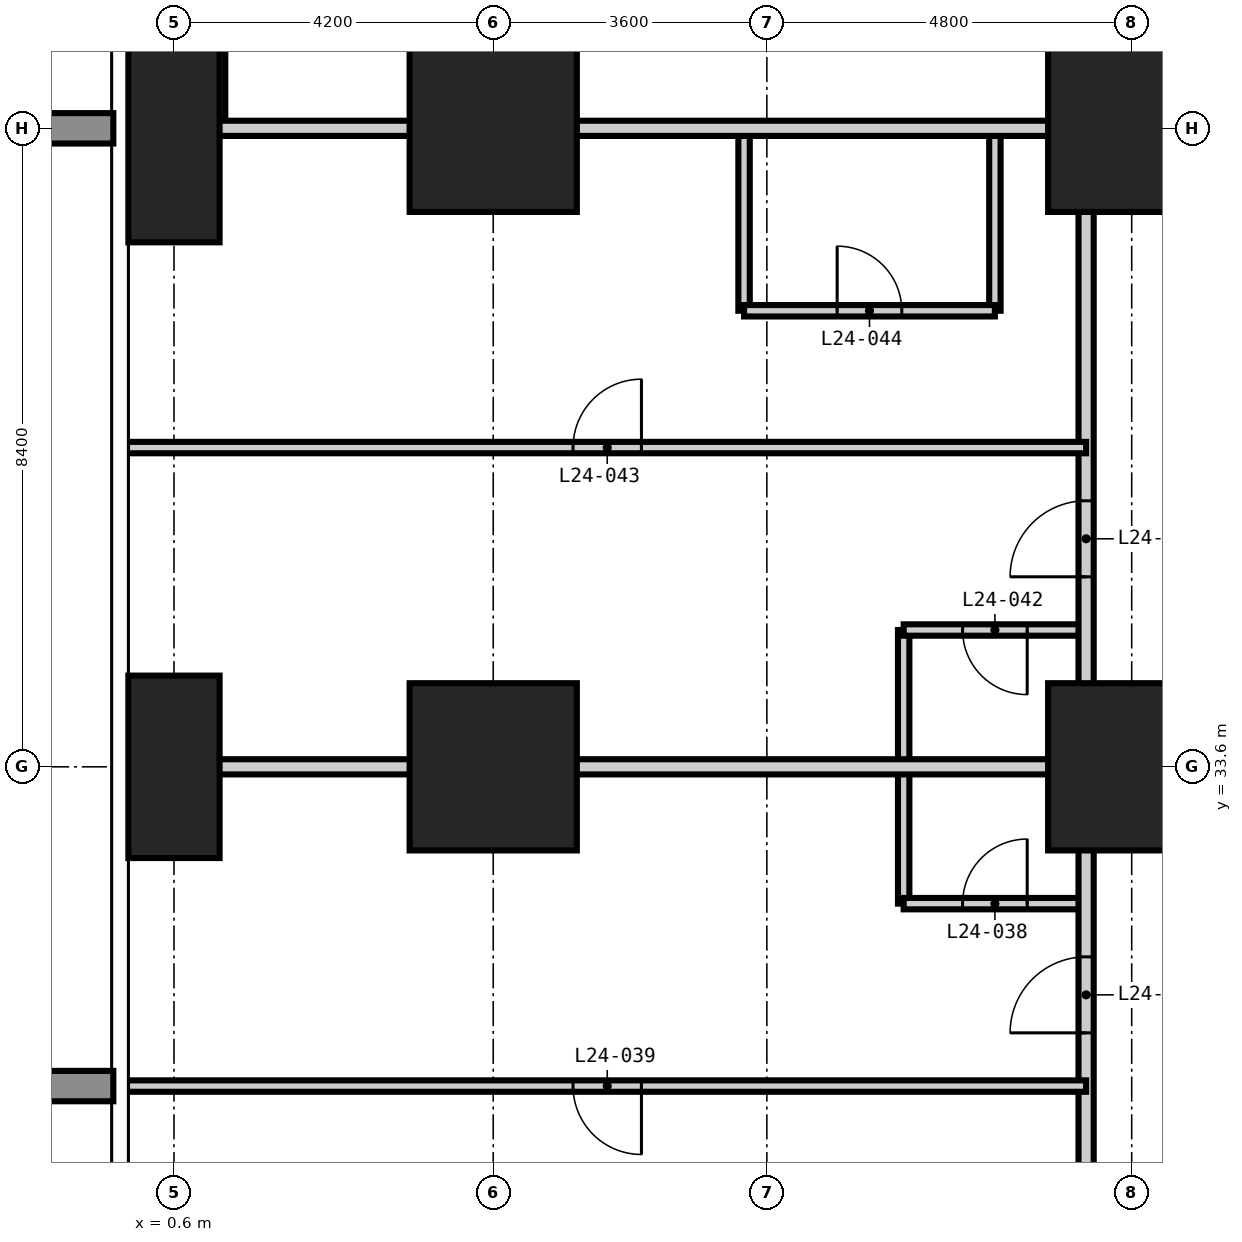
"""IFC4 building model, lengths in metres.
Left out: names, types, materials, properties, quantities, classifications, styles, units other than length and angle.
Written with IfcOpenShell. Run it as: python <this file> out.ifc"""

import sys

from ifc_helpers import new_model, si_unit, direction, frame, frame_2d, origin, origin_2d, place, context, subcontext, project, spatial, rectangle, extrude, element, fill, save


model = new_model("IFC4")
c1 = context("Model", 3, precision=1e-05, world=origin(), true_north=direction((0.0, 1.0)))
c2 = subcontext(c1, "Body", "Model", "MODEL_VIEW")
j1 = project(units=[si_unit("LENGTHUNIT", "METRE"), si_unit("PLANEANGLEUNIT", "RADIAN")], contexts=[c1])
p1 = place(None, origin())
s1 = spatial("IfcSite", under=j1, at=p1, CompositionType="ELEMENT")
p2 = place(p1, origin())
s2 = spatial("IfcBuilding", under=s1, at=p2, CompositionType="ELEMENT")
p3 = place(p2, frame((0.0, 0.0, 97.2)))
s3 = spatial("IfcBuildingStorey", under=s2, at=p3, CompositionType="ELEMENT", Elevation=97.2)
p4 = place(p3, frame((0.6, 33.6, -0.35), z_axis=(0.0, 0.0, 1.0), x_axis=(1.0, 0.0, 0.0)))
e1 = element("IfcColumn", 1, at=p4, inside=s3, PredefinedType="COLUMN", context=c2, shape_type="SweptSolid", body=[
    extrude(rectangle(XDim=1.2, YDim=2.4, at=origin_2d()), origin(), (0.0, 0.0, 1.0), 3.6),
])
p5 = place(p3, frame((0.6, 42.0, -0.35), z_axis=(0.0, 0.0, 1.0), x_axis=(1.0, 0.0, 0.0)))
e2 = element("IfcColumn", 2, at=p5, inside=s3, PredefinedType="COLUMN", context=c2, shape_type="SweptSolid", body=[
    extrude(rectangle(XDim=1.2, YDim=3.0, at=origin_2d()), origin(), (0.0, 0.0, 1.0), 3.6),
])
for number, where, z_axis, x_axis in (
    (3, (4.8, 33.6, -0.35), (0.0, 0.0, 1.0), (1.0, 0.0, 0.0)),
    (4, (4.8, 42.0, -0.35), (0.0, 0.0, 1.0), (1.0, 0.0, 0.0)),
    (5, (13.2, 33.6, -0.35), (0.0, 0.0, 1.0), (1.0, 0.0, 0.0)),
    (6, (13.2, 42.0, -0.35), (0.0, 0.0, 1.0), (1.0, 0.0, 0.0)),
):
    element("IfcColumn", number, at=place(p3, frame(where, z_axis=z_axis, x_axis=x_axis)), inside=s3, PredefinedType="COLUMN", context=c2, shape_type="SweptSolid", body=[
        extrude(rectangle(XDim=2.2, YDim=2.2, at=origin_2d()), origin(), (0.0, 0.0, 1.0), 3.6),
    ])
p6 = place(p3, frame((1.2, 42.0, 0.0), z_axis=(0.0, 0.0, 1.0), x_axis=(0.0, 1.0, 0.0)))
e7 = element("IfcWall", 7, at=p6, inside=s3, PredefinedType="PARTITIONING", context=c2, shape_type="SweptSolid", body=[
    extrude(rectangle(XDim=3.6, YDim=0.15, at=frame_2d((1.8, 0.0))), origin(), (0.0, 0.0, 1.0), 3.25),
])
p7 = place(p6, frame((1.575, 0.0, 0.0)))
e8 = element("IfcOpeningElement", 8, at=p7, cuts=e7, PredefinedType="OPENING", context=c2, shape_type="SweptSolid", body=[
    extrude(rectangle(XDim=0.85, YDim=2.1, at=frame_2d((0.425, 1.05))), frame((0.0, 0.085, 0.0), z_axis=(0.0, -1.0, 0.0), x_axis=(1.0, 0.0, 0.0)), (0.0, 0.0, 1.0), 0.17),
])
p8 = place(p3, frame((8.1, 39.6, 0.0), z_axis=(0.0, 0.0, 1.0), x_axis=(0.0, 1.0, 0.0)))
e9 = element("IfcWall", 9, at=p8, inside=s3, PredefinedType="PARTITIONING", context=c2, shape_type="SweptSolid", body=[
    extrude(rectangle(XDim=2.4, YDim=0.15, at=frame_2d((1.2, 0.0))), origin(), (0.0, 0.0, 1.0), 3.25),
])
p9 = place(p3, frame((10.2, 31.8, 0.0), z_axis=(0.0, 0.0, 1.0), x_axis=(0.0, 1.0, 0.0)))
e10 = element("IfcWall", 10, at=p9, inside=s3, PredefinedType="PARTITIONING", context=c2, shape_type="SweptSolid", body=[
    extrude(rectangle(XDim=3.6, YDim=0.15, at=frame_2d((1.8, 0.0))), origin(), (0.0, 0.0, 1.0), 3.25),
])
p10 = place(p3, frame((11.4, 39.6, 0.0), z_axis=(0.0, 0.0, 1.0), x_axis=(0.0, 1.0, 0.0)))
e11 = element("IfcWall", 11, at=p10, inside=s3, PredefinedType="PARTITIONING", context=c2, shape_type="SweptSolid", body=[
    extrude(rectangle(XDim=2.4, YDim=0.15, at=frame_2d((1.2, 0.0))), origin(), (0.0, 0.0, 1.0), 3.25),
])
p11 = place(p3, frame((10.2, 31.8, 0.0), z_axis=(0.0, 0.0, 1.0), x_axis=(1.0, 0.0, 0.0)))
e12 = element("IfcWall", 12, at=p11, inside=s3, PredefinedType="PARTITIONING", context=c2, shape_type="SweptSolid", body=[
    extrude(rectangle(XDim=2.4, YDim=0.15, at=frame_2d((1.2, 0.0))), origin(), (0.0, 0.0, 1.0), 3.25),
])
p12 = place(p11, frame((0.775, 0.0, 0.0)))
e13 = element("IfcOpeningElement", 13, at=p12, cuts=e12, PredefinedType="OPENING", context=c2, shape_type="SweptSolid", body=[
    extrude(rectangle(XDim=0.85, YDim=2.1, at=frame_2d((0.425, 1.05))), frame((0.0, 0.085, 0.0), z_axis=(0.0, -1.0, 0.0), x_axis=(1.0, 0.0, 0.0)), (0.0, 0.0, 1.0), 0.17),
])
p13 = place(p3, frame((10.2, 35.4, 0.0), z_axis=(0.0, 0.0, 1.0), x_axis=(1.0, 0.0, 0.0)))
e14 = element("IfcWall", 14, at=p13, inside=s3, PredefinedType="PARTITIONING", context=c2, shape_type="SweptSolid", body=[
    extrude(rectangle(XDim=2.4, YDim=0.15, at=frame_2d((1.2, 0.0))), origin(), (0.0, 0.0, 1.0), 3.25),
])
p14 = place(p13, frame((0.775, 0.0, 0.0)))
e15 = element("IfcOpeningElement", 15, at=p14, cuts=e14, PredefinedType="OPENING", context=c2, shape_type="SweptSolid", body=[
    extrude(rectangle(XDim=0.85, YDim=2.1, at=frame_2d((0.425, 1.05))), frame((0.0, 0.085, 0.0), z_axis=(0.0, -1.0, 0.0), x_axis=(1.0, 0.0, 0.0)), (0.0, 0.0, 1.0), 0.17),
])
p15 = place(p3, frame((8.1, 39.6, 0.0), z_axis=(0.0, 0.0, 1.0), x_axis=(1.0, 0.0, 0.0)))
e16 = element("IfcWall", 16, at=p15, inside=s3, PredefinedType="PARTITIONING", context=c2, shape_type="SweptSolid", body=[
    extrude(rectangle(XDim=3.3, YDim=0.15, at=frame_2d((1.65, 0.0))), origin(), (0.0, 0.0, 1.0), 3.25),
])
p16 = place(p15, frame((1.225, 0.0, 0.0)))
e17 = element("IfcOpeningElement", 17, at=p16, cuts=e16, PredefinedType="OPENING", context=c2, shape_type="SweptSolid", body=[
    extrude(rectangle(XDim=0.85, YDim=2.1, at=frame_2d((0.425, 1.05))), frame((0.0, 0.085, 0.0), z_axis=(0.0, -1.0, 0.0), x_axis=(1.0, 0.0, 0.0)), (0.0, 0.0, 1.0), 0.17),
])
p17 = place(p3, frame((12.6, 13.7, 0.0), z_axis=(0.0, 0.0, 1.0), x_axis=(0.0, 1.0, 0.0)))
e18 = element("IfcWall", 18, at=p17, inside=s3, PredefinedType="PARTITIONING", context=c2, shape_type="SweptSolid", body=[
    extrude(rectangle(XDim=32.0, YDim=0.2, at=frame_2d((16.0, 0.0))), origin(), (0.0, 0.0, 1.0), 3.25),
])
p18 = place(p17, frame((5.6, 0.0, 0.0)))
e19 = element("IfcOpeningElement", 19, at=p18, cuts=e18, PredefinedType="OPENING", context=c2, shape_type="SweptSolid", body=[
    extrude(rectangle(XDim=1.0, YDim=2.2, at=frame_2d((0.5, 1.1))), frame((0.0, 0.11, 0.0), z_axis=(0.0, -1.0, 0.0), x_axis=(1.0, 0.0, 0.0)), (0.0, 0.0, 1.0), 0.22),
])
p19 = place(p17, frame((16.4, 0.0, 0.0)))
e20 = element("IfcOpeningElement", 20, at=p19, cuts=e18, PredefinedType="OPENING", context=c2, shape_type="SweptSolid", body=[
    extrude(rectangle(XDim=1.0, YDim=2.2, at=frame_2d((0.5, 1.1))), frame((0.0, 0.11, 0.0), z_axis=(0.0, -1.0, 0.0), x_axis=(1.0, 0.0, 0.0)), (0.0, 0.0, 1.0), 0.22),
])
p20 = place(p17, frame((22.4, 0.0, 0.0)))
e21 = element("IfcOpeningElement", 21, at=p20, cuts=e18, PredefinedType="OPENING", context=c2, shape_type="SweptSolid", body=[
    extrude(rectangle(XDim=1.0, YDim=2.2, at=frame_2d((0.5, 1.1))), frame((0.0, 0.11, 0.0), z_axis=(0.0, -1.0, 0.0), x_axis=(1.0, 0.0, 0.0)), (0.0, 0.0, 1.0), 0.22),
])
p21 = place(p17, frame((0.95, 0.0, 0.0)))
e22 = element("IfcOpeningElement", 22, at=p21, cuts=e18, PredefinedType="OPENING", context=c2, shape_type="SweptSolid", body=[
    extrude(rectangle(XDim=1.0, YDim=2.2, at=frame_2d((0.5, 1.1))), frame((0.0, 0.11, 0.0), z_axis=(0.0, -1.0, 0.0), x_axis=(1.0, 0.0, 0.0)), (0.0, 0.0, 1.0), 0.22),
])
p22 = place(p17, frame((29.65, 0.0, 0.0)))
e23 = element("IfcOpeningElement", 23, at=p22, cuts=e18, PredefinedType="OPENING", context=c2, shape_type="SweptSolid", body=[
    extrude(rectangle(XDim=1.0, YDim=2.2, at=frame_2d((0.5, 1.1))), frame((0.0, 0.11, 0.0), z_axis=(0.0, -1.0, 0.0), x_axis=(1.0, 0.0, 0.0)), (0.0, 0.0, 1.0), 0.22),
])
for number, where, z_axis, x_axis in (
    (24, (-0.018, 33.6, 0.0), (0.0, 0.0, 1.0), (1.0, 0.0, 0.0)),
    (25, (-0.018, 42.0, 0.0), (0.0, 0.0, 1.0), (1.0, 0.0, 0.0)),
):
    element("IfcWall", number, at=place(p3, frame(where, z_axis=z_axis, x_axis=x_axis)), inside=s3, PredefinedType="PARTITIONING", context=c2, shape_type="SweptSolid", body=[
        extrude(rectangle(XDim=12.618, YDim=0.2, at=frame_2d((6.309, 0.0))), origin(), (0.0, 0.0, 1.0), 3.25),
    ])
p23 = place(p3, frame((4.2, 42.0, 0.0), z_axis=(0.0, 0.0, 1.0), x_axis=(0.0, 1.0, 0.0)))
e26 = element("IfcWall", 26, at=p23, inside=s3, PredefinedType="PARTITIONING", context=c2, shape_type="SweptSolid", body=[
    extrude(rectangle(XDim=12.618, YDim=0.15, at=frame_2d((6.309, 0.0))), origin(), (0.0, 0.0, 1.0), 3.25),
])
p24 = place(p23, frame((9.55, 0.0, 0.0)))
e27 = element("IfcOpeningElement", 27, at=p24, cuts=e26, PredefinedType="OPENING", context=c2, shape_type="SweptSolid", body=[
    extrude(rectangle(XDim=0.9, YDim=2.1, at=frame_2d((0.45, 1.05))), frame((0.0, 0.085, 0.0), z_axis=(0.0, -1.0, 0.0), x_axis=(1.0, 0.0, 0.0)), (0.0, 0.0, 1.0), 0.17),
])
p25 = place(p3, frame((-0.018, 29.4, 0.0), z_axis=(0.0, 0.0, 1.0), x_axis=(1.0, 0.0, 0.0)))
e28 = element("IfcWall", 28, at=p25, inside=s3, PredefinedType="PARTITIONING", context=c2, shape_type="SweptSolid", body=[
    extrude(rectangle(XDim=12.618, YDim=0.15, at=frame_2d((6.309, 0.0))), origin(), (0.0, 0.0, 1.0), 3.25),
])
p26 = place(p25, frame((5.868, 0.0, 0.0)))
e29 = element("IfcOpeningElement", 29, at=p26, cuts=e28, PredefinedType="OPENING", context=c2, shape_type="SweptSolid", body=[
    extrude(rectangle(XDim=0.9, YDim=2.1, at=frame_2d((0.45, 1.05))), frame((0.0, 0.085, 0.0), z_axis=(0.0, -1.0, 0.0), x_axis=(1.0, 0.0, 0.0)), (0.0, 0.0, 1.0), 0.17),
])
p27 = place(p3, frame((-0.018, 37.8, 0.0), z_axis=(0.0, 0.0, 1.0), x_axis=(1.0, 0.0, 0.0)))
e30 = element("IfcWall", 30, at=p27, inside=s3, PredefinedType="PARTITIONING", context=c2, shape_type="SweptSolid", body=[
    extrude(rectangle(XDim=12.618, YDim=0.15, at=frame_2d((6.309, 0.0))), origin(), (0.0, 0.0, 1.0), 3.25),
])
p28 = place(p27, frame((5.868, 0.0, 0.0)))
e31 = element("IfcOpeningElement", 31, at=p28, cuts=e30, PredefinedType="OPENING", context=c2, shape_type="SweptSolid", body=[
    extrude(rectangle(XDim=0.9, YDim=2.1, at=frame_2d((0.45, 1.05))), frame((0.0, 0.085, 0.0), z_axis=(0.0, -1.0, 0.0), x_axis=(1.0, 0.0, 0.0)), (0.0, 0.0, 1.0), 0.17),
])
p29 = place(p19, origin())
e32 = element("IfcDoor", 32, at=p29, inside=s3, OperationType="SINGLE_SWING_LEFT", PredefinedType="DOOR", context=c2, shape_type="SweptSolid", body=[
    extrude(rectangle(XDim=1.0, YDim=2.2, at=frame_2d((0.5, 1.1))), frame((0.0, 0.025, 0.0), z_axis=(0.0, -1.0, 0.0), x_axis=(1.0, 0.0, 0.0)), (0.0, 0.0, 1.0), 0.05),
])
fill(e20, e32)
p30 = place(p12, origin())
e33 = element("IfcDoor", 33, at=p30, inside=s3, OperationType="SINGLE_SWING_RIGHT", PredefinedType="DOOR", context=c2, shape_type="SweptSolid", body=[
    extrude(rectangle(XDim=0.85, YDim=2.1, at=frame_2d((0.425, 1.05))), frame((0.0, 0.025, 0.0), z_axis=(0.0, -1.0, 0.0), x_axis=(1.0, 0.0, 0.0)), (0.0, 0.0, 1.0), 0.05),
])
fill(e13, e33)
p31 = place(p26, frame((0.9, 0.0, 0.0), z_axis=(0.0, 0.0, 1.0), x_axis=(-1.0, 0.0, 0.0)))
e34 = element("IfcDoor", 34, at=p31, inside=s3, OperationType="SINGLE_SWING_LEFT", PredefinedType="DOOR", context=c2, shape_type="SweptSolid", body=[
    extrude(rectangle(XDim=0.9, YDim=2.1, at=frame_2d((0.45, 1.05))), frame((0.0, 0.025, 0.0), z_axis=(0.0, -1.0, 0.0), x_axis=(1.0, 0.0, 0.0)), (0.0, 0.0, 1.0), 0.05),
])
fill(e29, e34)
p32 = place(p20, origin())
e35 = element("IfcDoor", 35, at=p32, inside=s3, OperationType="SINGLE_SWING_LEFT", PredefinedType="DOOR", context=c2, shape_type="SweptSolid", body=[
    extrude(rectangle(XDim=1.0, YDim=2.2, at=frame_2d((0.5, 1.1))), frame((0.0, 0.025, 0.0), z_axis=(0.0, -1.0, 0.0), x_axis=(1.0, 0.0, 0.0)), (0.0, 0.0, 1.0), 0.05),
])
fill(e21, e35)
p33 = place(p14, frame((0.85, 0.0, 0.0), z_axis=(0.0, 0.0, 1.0), x_axis=(-1.0, 0.0, 0.0)))
e36 = element("IfcDoor", 36, at=p33, inside=s3, OperationType="SINGLE_SWING_LEFT", PredefinedType="DOOR", context=c2, shape_type="SweptSolid", body=[
    extrude(rectangle(XDim=0.85, YDim=2.1, at=frame_2d((0.425, 1.05))), frame((0.0, 0.025, 0.0), z_axis=(0.0, -1.0, 0.0), x_axis=(1.0, 0.0, 0.0)), (0.0, 0.0, 1.0), 0.05),
])
fill(e15, e36)
p34 = place(p28, origin())
e37 = element("IfcDoor", 37, at=p34, inside=s3, OperationType="SINGLE_SWING_RIGHT", PredefinedType="DOOR", context=c2, shape_type="SweptSolid", body=[
    extrude(rectangle(XDim=0.9, YDim=2.1, at=frame_2d((0.45, 1.05))), frame((0.0, 0.025, 0.0), z_axis=(0.0, -1.0, 0.0), x_axis=(1.0, 0.0, 0.0)), (0.0, 0.0, 1.0), 0.05),
])
fill(e31, e37)
p35 = place(p16, origin())
e38 = element("IfcDoor", 38, at=p35, inside=s3, OperationType="SINGLE_SWING_LEFT", PredefinedType="DOOR", context=c2, shape_type="SweptSolid", body=[
    extrude(rectangle(XDim=0.85, YDim=2.1, at=frame_2d((0.425, 1.05))), frame((0.0, 0.025, 0.0), z_axis=(0.0, -1.0, 0.0), x_axis=(1.0, 0.0, 0.0)), (0.0, 0.0, 1.0), 0.05),
])
fill(e17, e38)
save(model, sys.argv[1])
